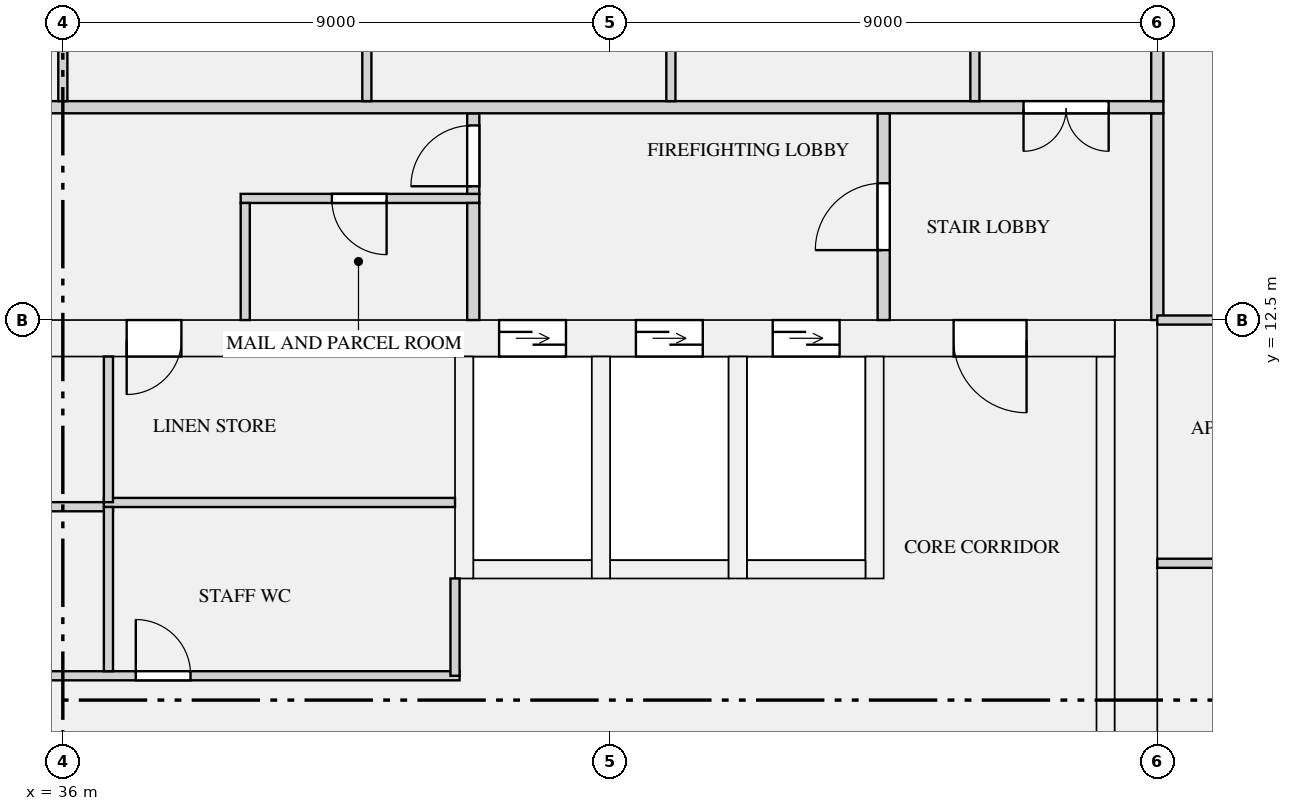
"""IFC4 building model, lengths in metres.
Left out: names, types, materials, properties, quantities, classifications, styles, units other than length and angle.
Written with IfcOpenShell. Run it as: python <this file> out.ifc"""

import sys

from ifc_helpers import new_model, si_unit, direction, frame, frame_2d, origin, place, context, subcontext, project, spatial, rectangle, extrude, element, fill, save


model = new_model("IFC4")
c1 = context("Model", 3, precision=1e-05, world=origin(), true_north=direction((0.0, 1.0)))
c2 = subcontext(c1, "Body", "Model", "MODEL_VIEW")
j1 = project(units=[si_unit("LENGTHUNIT", "METRE"), si_unit("PLANEANGLEUNIT", "RADIAN")], contexts=[c1])
p1 = place(None, origin())
s1 = spatial("IfcSite", under=j1, at=p1, CompositionType="ELEMENT")
p2 = place(p1, origin())
s2 = spatial("IfcBuilding", under=s1, at=p2, CompositionType="ELEMENT")
p3 = place(p2, frame((0.0, 0.0, 182.25)))
s3 = spatial("IfcBuildingStorey", under=s2, at=p3, CompositionType="ELEMENT", Elevation=182.25)
p4 = place(p3, frame((53.65, 0.0, 0.0), z_axis=(0.0, 0.0, 1.0), x_axis=(0.0, 1.0, 0.0)))
e1 = element("IfcWall", 1, at=p4, inside=s3, PredefinedType="SHEAR", context=c2, shape_type="SweptSolid", body=[
    extrude(rectangle(XDim=12.5, YDim=0.7, at=frame_2d((6.25, 0.0))), origin(), (0.0, 0.0, 1.0), 3.15),
])
p5 = place(p3, frame((18.7, 12.2, 0.0), z_axis=(0.0, 0.0, 1.0), x_axis=(1.0, 0.0, 0.0)))
e2 = element("IfcWall", 2, at=p5, inside=s3, PredefinedType="SHEAR", context=c2, shape_type="SweptSolid", body=[
    extrude(rectangle(XDim=34.6, YDim=0.6, at=frame_2d((17.3, 0.0))), origin(), (0.0, 0.0, 1.0), 3.15),
])
p6 = place(p5, frame((24.475, 0.0, 0.0)))
e3 = element("IfcOpeningElement", 3, at=p6, cuts=e2, PredefinedType="OPENING", context=c2, shape_type="SweptSolid", body=[
    extrude(rectangle(XDim=1.1, YDim=2.1, at=frame_2d((0.55, 1.05))), frame((0.0, 0.31, 0.0), z_axis=(0.0, -1.0, 0.0), x_axis=(1.0, 0.0, 0.0)), (0.0, 0.0, 1.0), 0.62),
])
p7 = place(p5, frame((26.725, 0.0, 0.0)))
e4 = element("IfcOpeningElement", 4, at=p7, cuts=e2, PredefinedType="OPENING", context=c2, shape_type="SweptSolid", body=[
    extrude(rectangle(XDim=1.1, YDim=2.1, at=frame_2d((0.55, 1.05))), frame((0.0, 0.31, 0.0), z_axis=(0.0, -1.0, 0.0), x_axis=(1.0, 0.0, 0.0)), (0.0, 0.0, 1.0), 0.62),
])
p8 = place(p5, frame((28.975, 0.0, 0.0)))
e5 = element("IfcOpeningElement", 5, at=p8, cuts=e2, PredefinedType="OPENING", context=c2, shape_type="SweptSolid", body=[
    extrude(rectangle(XDim=1.1, YDim=2.1, at=frame_2d((0.55, 1.05))), frame((0.0, 0.31, 0.0), z_axis=(0.0, -1.0, 0.0), x_axis=(1.0, 0.0, 0.0)), (0.0, 0.0, 1.0), 0.62),
])
p9 = place(p5, frame((4.85, 0.0, 0.0)))
e6 = element("IfcOpeningElement", 6, at=p9, cuts=e2, PredefinedType="OPENING", context=c2, shape_type="SweptSolid", body=[
    extrude(rectangle(XDim=0.9, YDim=2.1, at=frame_2d((0.45, 1.05))), frame((0.0, 0.31, 0.0), z_axis=(0.0, -1.0, 0.0), x_axis=(1.0, 0.0, 0.0)), (0.0, 0.0, 1.0), 0.62),
])
p10 = place(p5, frame((11.85, 0.0, 0.0)))
e7 = element("IfcOpeningElement", 7, at=p10, cuts=e2, PredefinedType="OPENING", context=c2, shape_type="SweptSolid", body=[
    extrude(rectangle(XDim=0.9, YDim=2.1, at=frame_2d((0.45, 1.05))), frame((0.0, 0.31, 0.0), z_axis=(0.0, -1.0, 0.0), x_axis=(1.0, 0.0, 0.0)), (0.0, 0.0, 1.0), 0.62),
])
p11 = place(p5, frame((18.35, 0.0, 0.0)))
e8 = element("IfcOpeningElement", 8, at=p11, cuts=e2, PredefinedType="OPENING", context=c2, shape_type="SweptSolid", body=[
    extrude(rectangle(XDim=0.9, YDim=2.1, at=frame_2d((0.45, 1.05))), frame((0.0, 0.31, 0.0), z_axis=(0.0, -1.0, 0.0), x_axis=(1.0, 0.0, 0.0)), (0.0, 0.0, 1.0), 0.62),
])
p12 = place(p5, frame((1.45, 0.0, 0.0)))
e9 = element("IfcOpeningElement", 9, at=p12, cuts=e2, PredefinedType="OPENING", context=c2, shape_type="SweptSolid", body=[
    extrude(rectangle(XDim=1.2, YDim=2.1, at=frame_2d((0.6, 1.05))), frame((0.0, 0.31, 0.0), z_axis=(0.0, -1.0, 0.0), x_axis=(1.0, 0.0, 0.0)), (0.0, 0.0, 1.0), 0.62),
])
p13 = place(p5, frame((31.95, 0.0, 0.0)))
e10 = element("IfcOpeningElement", 10, at=p13, cuts=e2, PredefinedType="OPENING", context=c2, shape_type="SweptSolid", body=[
    extrude(rectangle(XDim=1.2, YDim=2.1, at=frame_2d((0.6, 1.05))), frame((0.0, 0.31, 0.0), z_axis=(0.0, -1.0, 0.0), x_axis=(1.0, 0.0, 0.0)), (0.0, 0.0, 1.0), 0.62),
])
p14 = place(p3, frame((53.15, 1.0, 0.0), z_axis=(0.0, 0.0, 1.0), x_axis=(0.0, 1.0, 0.0)))
e11 = element("IfcWall", 11, at=p14, inside=s3, PredefinedType="SHEAR", context=c2, shape_type="SweptSolid", body=[
    extrude(rectangle(XDim=10.9, YDim=0.3, at=frame_2d((5.45, 0.0))), origin(), (0.0, 0.0, 1.0), 3.15),
])
p15 = place(p3, frame((42.75, 8.4, 0.0), z_axis=(0.0, 0.0, 1.0), x_axis=(1.0, 0.0, 0.0)))
e12 = element("IfcWall", 12, at=p15, inside=s3, PredefinedType="SHEAR", context=c2, shape_type="SweptSolid", body=[
    extrude(rectangle(XDim=1.95, YDim=0.3, at=frame_2d((0.975, 0.0))), origin(), (0.0, 0.0, 1.0), 3.15),
])
p16 = place(p3, frame((42.6, 8.25, 0.0), z_axis=(0.0, 0.0, 1.0), x_axis=(0.0, 1.0, 0.0)))
e13 = element("IfcWall", 13, at=p16, inside=s3, PredefinedType="SHEAR", context=c2, shape_type="SweptSolid", body=[
    extrude(rectangle(XDim=3.65, YDim=0.3, at=frame_2d((1.825, 0.0))), origin(), (0.0, 0.0, 1.0), 3.15),
])
p17 = place(p3, frame((45.0, 8.4, 0.0), z_axis=(0.0, 0.0, 1.0), x_axis=(1.0, 0.0, 0.0)))
e14 = element("IfcWall", 14, at=p17, inside=s3, PredefinedType="SHEAR", context=c2, shape_type="SweptSolid", body=[
    extrude(rectangle(XDim=1.95, YDim=0.3, at=frame_2d((0.975, 0.0))), origin(), (0.0, 0.0, 1.0), 3.15),
])
p18 = place(p3, frame((44.85, 8.25, 0.0), z_axis=(0.0, 0.0, 1.0), x_axis=(0.0, 1.0, 0.0)))
e15 = element("IfcWall", 15, at=p18, inside=s3, PredefinedType="SHEAR", context=c2, shape_type="SweptSolid", body=[
    extrude(rectangle(XDim=3.65, YDim=0.3, at=frame_2d((1.825, 0.0))), origin(), (0.0, 0.0, 1.0), 3.15),
])
p19 = place(p3, frame((47.25, 8.4, 0.0), z_axis=(0.0, 0.0, 1.0), x_axis=(1.0, 0.0, 0.0)))
e16 = element("IfcWall", 16, at=p19, inside=s3, PredefinedType="SHEAR", context=c2, shape_type="SweptSolid", body=[
    extrude(rectangle(XDim=1.95, YDim=0.3, at=frame_2d((0.975, 0.0))), origin(), (0.0, 0.0, 1.0), 3.15),
])
for number, where, z_axis, x_axis in (
    (17, (47.1, 8.25, 0.0), (0.0, 0.0, 1.0), (0.0, 1.0, 0.0)),
    (18, (49.35, 8.25, 0.0), (0.0, 0.0, 1.0), (0.0, 1.0, 0.0)),
):
    element("IfcWall", number, at=place(p3, frame(where, z_axis=z_axis, x_axis=x_axis)), inside=s3, PredefinedType="SHEAR", context=c2, shape_type="SweptSolid", body=[
        extrude(rectangle(XDim=3.65, YDim=0.3, at=frame_2d((1.825, 0.0))), origin(), (0.0, 0.0, 1.0), 3.15),
    ])
p20 = place(p3, frame((22.725, 6.65, 0.0), z_axis=(0.0, 0.0, 1.0), x_axis=(1.0, 0.0, 0.0)))
e19 = element("IfcWall", 19, at=p20, inside=s3, PredefinedType="PARTITIONING", context=c2, shape_type="SweptSolid", body=[
    extrude(rectangle(XDim=19.8, YDim=0.15, at=frame_2d((9.9, 0.0))), origin(), (0.0, 0.0, 1.0), 2.65),
])
p21 = place(p20, frame((0.825, 0.0, 0.0)))
e20 = element("IfcOpeningElement", 20, at=p21, cuts=e19, PredefinedType="OPENING", context=c2, shape_type="SweptSolid", body=[
    extrude(rectangle(XDim=0.9, YDim=2.1, at=frame_2d((0.45, 1.05))), frame((0.0, 0.085, 0.0), z_axis=(0.0, -1.0, 0.0), x_axis=(1.0, 0.0, 0.0)), (0.0, 0.0, 1.0), 0.17),
])
p22 = place(p20, frame((7.825, 0.0, 0.0)))
e21 = element("IfcOpeningElement", 21, at=p22, cuts=e19, PredefinedType="OPENING", context=c2, shape_type="SweptSolid", body=[
    extrude(rectangle(XDim=0.9, YDim=2.1, at=frame_2d((0.45, 1.05))), frame((0.0, 0.085, 0.0), z_axis=(0.0, -1.0, 0.0), x_axis=(1.0, 0.0, 0.0)), (0.0, 0.0, 1.0), 0.17),
])
p23 = place(p20, frame((14.475, 0.0, 0.0)))
e22 = element("IfcOpeningElement", 22, at=p23, cuts=e19, PredefinedType="OPENING", context=c2, shape_type="SweptSolid", body=[
    extrude(rectangle(XDim=0.9, YDim=2.1, at=frame_2d((0.45, 1.05))), frame((0.0, 0.085, 0.0), z_axis=(0.0, -1.0, 0.0), x_axis=(1.0, 0.0, 0.0)), (0.0, 0.0, 1.0), 0.17),
])
p24 = place(p3, frame((22.725, 9.43, 0.0), z_axis=(0.0, 0.0, 1.0), x_axis=(1.0, 0.0, 0.0)))
e23 = element("IfcWall", 23, at=p24, inside=s3, PredefinedType="PARTITIONING", context=c2, shape_type="SweptSolid", body=[
    extrude(rectangle(XDim=14.1, YDim=0.15, at=frame_2d((7.05, 0.0))), origin(), (0.0, 0.0, 1.0), 2.65),
])
p25 = place(p3, frame((36.675, 9.5, 0.0), z_axis=(0.0, 0.0, 1.0), x_axis=(1.0, 0.0, 0.0)))
e24 = element("IfcWall", 24, at=p25, inside=s3, PredefinedType="PARTITIONING", context=c2, shape_type="SweptSolid", body=[
    extrude(rectangle(XDim=5.775, YDim=0.15, at=frame_2d((2.887, 0.0))), origin(), (0.0, 0.0, 1.0), 2.65),
])
p26 = place(p3, frame((38.925, 14.5, 0.0), z_axis=(0.0, 0.0, 1.0), x_axis=(1.0, 0.0, 0.0)))
e25 = element("IfcWall", 25, at=p26, inside=s3, PredefinedType="PARTITIONING", context=c2, shape_type="SweptSolid", body=[
    extrude(rectangle(XDim=3.925, YDim=0.15, at=frame_2d((1.962, 0.0))), origin(), (0.0, 0.0, 1.0), 2.65),
])
p27 = place(p26, frame((1.5, 0.0, 0.0)))
e26 = element("IfcOpeningElement", 26, at=p27, cuts=e25, PredefinedType="OPENING", context=c2, shape_type="SweptSolid", body=[
    extrude(rectangle(XDim=0.9, YDim=2.1, at=frame_2d((0.45, 1.05))), frame((0.0, 0.085, 0.0), z_axis=(0.0, -1.0, 0.0), x_axis=(1.0, 0.0, 0.0)), (0.0, 0.0, 1.0), 0.17),
])
p28 = place(p3, frame((42.45, 6.65, 0.0), z_axis=(0.0, 0.0, 1.0), x_axis=(0.0, 1.0, 0.0)))
e27 = element("IfcWall", 27, at=p28, inside=s3, PredefinedType="PARTITIONING", context=c2, shape_type="SweptSolid", body=[
    extrude(rectangle(XDim=1.6, YDim=0.15, at=frame_2d((0.8, 0.0))), origin(), (0.0, 0.0, 1.0), 2.65),
])
p29 = place(p3, frame((36.75, 6.725, 0.0), z_axis=(0.0, 0.0, 1.0), x_axis=(0.0, 1.0, 0.0)))
e28 = element("IfcWall", 28, at=p29, inside=s3, PredefinedType="PARTITIONING", context=c2, shape_type="SweptSolid", body=[
    extrude(rectangle(XDim=2.7, YDim=0.15, at=frame_2d((1.35, 0.0))), origin(), (0.0, 0.0, 1.0), 2.65),
])
p30 = place(p3, frame((36.75, 9.505, 0.0), z_axis=(0.0, 0.0, 1.0), x_axis=(0.0, 1.0, 0.0)))
e29 = element("IfcWall", 29, at=p30, inside=s3, PredefinedType="PARTITIONING", context=c2, shape_type="SweptSolid", body=[
    extrude(rectangle(XDim=2.395, YDim=0.15, at=frame_2d((1.198, 0.0))), origin(), (0.0, 0.0, 1.0), 2.65),
])
p31 = place(p3, frame((39.0, 12.5, 0.0), z_axis=(0.0, 0.0, 1.0), x_axis=(0.0, 1.0, 0.0)))
e30 = element("IfcWall", 30, at=p31, inside=s3, PredefinedType="PARTITIONING", context=c2, shape_type="SweptSolid", body=[
    extrude(rectangle(XDim=1.925, YDim=0.15, at=frame_2d((0.962, 0.0))), origin(), (0.0, 0.0, 1.0), 2.65),
])
p32 = place(p3, frame((42.75, 12.5, 0.0), z_axis=(0.0, 0.0, 1.0), x_axis=(0.0, 1.0, 0.0)))
e31 = element("IfcWall", 31, at=p32, inside=s3, PredefinedType="PARTITIONING", context=c2, shape_type="SweptSolid", body=[
    extrude(rectangle(XDim=1.925, YDim=0.2, at=frame_2d((0.962, 0.0))), origin(), (0.0, 0.0, 1.0), 2.65),
])
p33 = place(p3, frame((49.5, 12.5, 0.0), z_axis=(0.0, 0.0, 1.0), x_axis=(0.0, 1.0, 0.0)))
e32 = element("IfcWall", 32, at=p33, inside=s3, PredefinedType="PARTITIONING", context=c2, shape_type="SweptSolid", body=[
    extrude(rectangle(XDim=3.4, YDim=0.2, at=frame_2d((1.7, 0.0))), origin(), (0.0, 0.0, 1.0), 2.65),
])
p34 = place(p33, frame((1.15, 0.0, 0.0)))
e33 = element("IfcOpeningElement", 33, at=p34, cuts=e32, PredefinedType="OPENING", context=c2, shape_type="SweptSolid", body=[
    extrude(rectangle(XDim=1.1, YDim=2.1, at=frame_2d((0.55, 1.05))), frame((0.0, 0.11, 0.0), z_axis=(0.0, -1.0, 0.0), x_axis=(1.0, 0.0, 0.0)), (0.0, 0.0, 1.0), 0.22),
])
p35 = place(p3, frame((54.0, 12.5, 0.0), z_axis=(0.0, 0.0, 1.0), x_axis=(0.0, 1.0, 0.0)))
e34 = element("IfcWall", 34, at=p35, inside=s3, PredefinedType="PARTITIONING", context=c2, shape_type="SweptSolid", body=[
    extrude(rectangle(XDim=3.4, YDim=0.2, at=frame_2d((1.7, 0.0))), origin(), (0.0, 0.0, 1.0), 2.65),
])
p36 = place(p3, frame((42.75, 14.575, 0.0), z_axis=(0.0, 0.0, 1.0), x_axis=(0.0, 1.0, 0.0)))
e35 = element("IfcWall", 35, at=p36, inside=s3, PredefinedType="PARTITIONING", context=c2, shape_type="SweptSolid", body=[
    extrude(rectangle(XDim=1.325, YDim=0.2, at=frame_2d((0.663, 0.0))), origin(), (0.0, 0.0, 1.0), 2.65),
])
p37 = place(p36, frame((0.125, 0.0, 0.0)))
e36 = element("IfcOpeningElement", 36, at=p37, cuts=e35, PredefinedType="OPENING", context=c2, shape_type="SweptSolid", body=[
    extrude(rectangle(XDim=1.0, YDim=2.1, at=frame_2d((0.5, 1.05))), frame((0.0, 0.11, 0.0), z_axis=(0.0, -1.0, 0.0), x_axis=(1.0, 0.0, 0.0)), (0.0, 0.0, 1.0), 0.22),
])
p38 = place(p3, frame((54.0, 8.5, 0.0), z_axis=(0.0, 0.0, 1.0), x_axis=(1.0, 0.0, 0.0)))
e37 = element("IfcWall", 37, at=p38, inside=s3, PredefinedType="PARTITIONING", context=c2, shape_type="SweptSolid", body=[
    extrude(rectangle(XDim=17.3, YDim=0.15, at=frame_2d((8.65, 0.0))), origin(), (0.0, 0.0, 1.0), 2.65),
])
p39 = place(p38, frame((1.8, 0.0, 0.0)))
e38 = element("IfcOpeningElement", 38, at=p39, cuts=e37, PredefinedType="OPENING", context=c2, shape_type="SweptSolid", body=[
    extrude(rectangle(XDim=0.9, YDim=2.1, at=frame_2d((0.45, 1.05))), frame((0.0, 0.085, 0.0), z_axis=(0.0, -1.0, 0.0), x_axis=(1.0, 0.0, 0.0)), (0.0, 0.0, 1.0), 0.17),
])
p40 = place(p38, frame((6.3, 0.0, 0.0)))
e39 = element("IfcOpeningElement", 39, at=p40, cuts=e37, PredefinedType="OPENING", context=c2, shape_type="SweptSolid", body=[
    extrude(rectangle(XDim=0.9, YDim=2.1, at=frame_2d((0.45, 1.05))), frame((0.0, 0.085, 0.0), z_axis=(0.0, -1.0, 0.0), x_axis=(1.0, 0.0, 0.0)), (0.0, 0.0, 1.0), 0.17),
])
p41 = place(p38, frame((10.8, 0.0, 0.0)))
e40 = element("IfcOpeningElement", 40, at=p41, cuts=e37, PredefinedType="OPENING", context=c2, shape_type="SweptSolid", body=[
    extrude(rectangle(XDim=0.9, YDim=2.1, at=frame_2d((0.45, 1.05))), frame((0.0, 0.085, 0.0), z_axis=(0.0, -1.0, 0.0), x_axis=(1.0, 0.0, 0.0)), (0.0, 0.0, 1.0), 0.17),
])
p42 = place(p3, frame((54.0, 12.5, 0.0), z_axis=(0.0, 0.0, 1.0), x_axis=(1.0, 0.0, 0.0)))
e41 = element("IfcWall", 41, at=p42, inside=s3, PredefinedType="PARTITIONING", context=c2, shape_type="SweptSolid", body=[
    extrude(rectangle(XDim=17.3, YDim=0.15, at=frame_2d((8.65, 0.0))), origin(), (0.0, 0.0, 1.0), 2.65),
])
p43 = place(p42, frame((1.5, 0.0, 0.0)))
e42 = element("IfcOpeningElement", 42, at=p43, cuts=e41, PredefinedType="OPENING", context=c2, shape_type="SweptSolid", body=[
    extrude(rectangle(XDim=1.5, YDim=2.1, at=frame_2d((0.75, 1.05))), frame((0.0, 0.085, 0.0), z_axis=(0.0, -1.0, 0.0), x_axis=(1.0, 0.0, 0.0)), (0.0, 0.0, 1.0), 0.17),
])
p44 = place(p42, frame((12.75, 0.0, 0.0)))
e43 = element("IfcOpeningElement", 43, at=p44, cuts=e41, PredefinedType="OPENING", context=c2, shape_type="SweptSolid", body=[
    extrude(rectangle(XDim=1.5, YDim=2.1, at=frame_2d((0.75, 1.05))), frame((0.0, 0.085, 0.0), z_axis=(0.0, -1.0, 0.0), x_axis=(1.0, 0.0, 0.0)), (0.0, 0.0, 1.0), 0.17),
])
p45 = place(p3, frame((17.9, 16.0, 0.0), z_axis=(0.0, 0.0, 1.0), x_axis=(1.0, 0.0, 0.0)))
e44 = element("IfcWall", 44, at=p45, inside=s3, PredefinedType="PARTITIONING", context=c2, shape_type="SweptSolid", body=[
    extrude(rectangle(XDim=36.2, YDim=0.2, at=frame_2d((18.1, 0.0))), origin(), (0.0, 0.0, 1.0), 2.65),
])
p46 = place(p45, frame((0.9, 0.0, 0.0)))
e45 = element("IfcOpeningElement", 45, at=p46, cuts=e44, PredefinedType="OPENING", context=c2, shape_type="SweptSolid", body=[
    extrude(rectangle(XDim=1.4, YDim=2.1, at=frame_2d((0.7, 1.05))), frame((0.0, 0.11, 0.0), z_axis=(0.0, -1.0, 0.0), x_axis=(1.0, 0.0, 0.0)), (0.0, 0.0, 1.0), 0.22),
])
p47 = place(p45, frame((33.9, 0.0, 0.0)))
e46 = element("IfcOpeningElement", 46, at=p47, cuts=e44, PredefinedType="OPENING", context=c2, shape_type="SweptSolid", body=[
    extrude(rectangle(XDim=1.4, YDim=2.1, at=frame_2d((0.7, 1.05))), frame((0.0, 0.11, 0.0), z_axis=(0.0, -1.0, 0.0), x_axis=(1.0, 0.0, 0.0)), (0.0, 0.0, 1.0), 0.22),
])
p48 = place(p3, frame((54.0, 16.1, 0.0), z_axis=(0.0, 0.0, 1.0), x_axis=(0.0, 1.0, 0.0)))
e47 = element("IfcWall", 47, at=p48, inside=s3, PredefinedType="PARTITIONING", context=c2, shape_type="SweptSolid", body=[
    extrude(rectangle(XDim=7.8, YDim=0.2, at=frame_2d((3.9, 0.0))), origin(), (0.0, 0.0, 1.0), 2.65),
])
p49 = place(p48, frame((1.85, 0.0, 0.0)))
e48 = element("IfcOpeningElement", 48, at=p49, cuts=e47, PredefinedType="OPENING", context=c2, shape_type="SweptSolid", body=[
    extrude(rectangle(XDim=1.1, YDim=2.1, at=frame_2d((0.55, 1.05))), frame((0.0, 0.11, 0.0), z_axis=(0.0, -1.0, 0.0), x_axis=(1.0, 0.0, 0.0)), (0.0, 0.0, 1.0), 0.22),
])
for number, where, z_axis, x_axis in (
    (49, (51.0, 16.1, 0.0), (0.0, 0.0, 1.0), (0.0, 1.0, 0.0)),
    (50, (36.0, 16.1, 0.0), (0.0, 0.0, 1.0), (0.0, 1.0, 0.0)),
    (51, (41.0, 16.1, 0.0), (0.0, 0.0, 1.0), (0.0, 1.0, 0.0)),
    (52, (46.0, 16.1, 0.0), (0.0, 0.0, 1.0), (0.0, 1.0, 0.0)),
):
    element("IfcWall", number, at=place(p3, frame(where, z_axis=z_axis, x_axis=x_axis)), inside=s3, PredefinedType="PARTITIONING", context=c2, shape_type="SweptSolid", body=[
        extrude(rectangle(XDim=4.825, YDim=0.15, at=frame_2d((2.413, 0.0))), origin(), (0.0, 0.0, 1.0), 2.65),
    ])
p50 = place(p6, origin())
e53 = element("IfcDoor", 53, at=p50, inside=s3, OperationType="DOUBLE_DOOR_SLIDING", PredefinedType="DOOR", context=c2, shape_type="SweptSolid", body=[
    extrude(rectangle(XDim=1.1, YDim=2.1, at=frame_2d((0.55, 1.05))), frame((0.0, 0.025, 0.0), z_axis=(0.0, -1.0, 0.0), x_axis=(1.0, 0.0, 0.0)), (0.0, 0.0, 1.0), 0.05),
])
fill(e3, e53)
p51 = place(p7, origin())
e54 = element("IfcDoor", 54, at=p51, inside=s3, OperationType="DOUBLE_DOOR_SLIDING", PredefinedType="DOOR", context=c2, shape_type="SweptSolid", body=[
    extrude(rectangle(XDim=1.1, YDim=2.1, at=frame_2d((0.55, 1.05))), frame((0.0, 0.025, 0.0), z_axis=(0.0, -1.0, 0.0), x_axis=(1.0, 0.0, 0.0)), (0.0, 0.0, 1.0), 0.05),
])
fill(e4, e54)
p52 = place(p8, origin())
e55 = element("IfcDoor", 55, at=p52, inside=s3, OperationType="DOUBLE_DOOR_SLIDING", PredefinedType="DOOR", context=c2, shape_type="SweptSolid", body=[
    extrude(rectangle(XDim=1.1, YDim=2.1, at=frame_2d((0.55, 1.05))), frame((0.0, 0.025, 0.0), z_axis=(0.0, -1.0, 0.0), x_axis=(1.0, 0.0, 0.0)), (0.0, 0.0, 1.0), 0.05),
])
fill(e5, e55)
p53 = place(p27, frame((0.9, 0.0, 0.0), z_axis=(0.0, 0.0, 1.0), x_axis=(-1.0, 0.0, 0.0)))
e56 = element("IfcDoor", 56, at=p53, inside=s3, OperationType="SINGLE_SWING_LEFT", PredefinedType="DOOR", context=c2, shape_type="SweptSolid", body=[
    extrude(rectangle(XDim=0.9, YDim=2.1, at=frame_2d((0.45, 1.05))), frame((0.0, 0.025, 0.0), z_axis=(0.0, -1.0, 0.0), x_axis=(1.0, 0.0, 0.0)), (0.0, 0.0, 1.0), 0.05),
])
fill(e26, e56)
p54 = place(p23, origin())
e57 = element("IfcDoor", 57, at=p54, inside=s3, OperationType="SINGLE_SWING_LEFT", PredefinedType="DOOR", context=c2, shape_type="SweptSolid", body=[
    extrude(rectangle(XDim=0.9, YDim=2.1, at=frame_2d((0.45, 1.05))), frame((0.0, 0.025, 0.0), z_axis=(0.0, -1.0, 0.0), x_axis=(1.0, 0.0, 0.0)), (0.0, 0.0, 1.0), 0.05),
])
fill(e22, e57)
p55 = place(p11, frame((0.9, 0.0, 0.0), z_axis=(0.0, 0.0, 1.0), x_axis=(-1.0, 0.0, 0.0)))
e58 = element("IfcDoor", 58, at=p55, inside=s3, OperationType="SINGLE_SWING_RIGHT", PredefinedType="DOOR", context=c2, shape_type="SweptSolid", body=[
    extrude(rectangle(XDim=0.9, YDim=2.1, at=frame_2d((0.45, 1.05))), frame((0.0, 0.025, 0.0), z_axis=(0.0, -1.0, 0.0), x_axis=(1.0, 0.0, 0.0)), (0.0, 0.0, 1.0), 0.05),
])
fill(e8, e58)
p56 = place(p13, frame((1.2, 0.0, 0.0), z_axis=(0.0, 0.0, 1.0), x_axis=(-1.0, 0.0, 0.0)))
e59 = element("IfcDoor", 59, at=p56, inside=s3, OperationType="SINGLE_SWING_LEFT", PredefinedType="DOOR", context=c2, shape_type="SweptSolid", body=[
    extrude(rectangle(XDim=1.2, YDim=2.1, at=frame_2d((0.6, 1.05))), frame((0.0, 0.025, 0.0), z_axis=(0.0, -1.0, 0.0), x_axis=(1.0, 0.0, 0.0)), (0.0, 0.0, 1.0), 0.05),
])
fill(e10, e59)
p57 = place(p37, origin())
e60 = element("IfcDoor", 60, at=p57, inside=s3, OperationType="SINGLE_SWING_LEFT", PredefinedType="DOOR", context=c2, shape_type="SweptSolid", body=[
    extrude(rectangle(XDim=1.0, YDim=2.1, at=frame_2d((0.5, 1.05))), frame((0.0, 0.025, 0.0), z_axis=(0.0, -1.0, 0.0), x_axis=(1.0, 0.0, 0.0)), (0.0, 0.0, 1.0), 0.05),
])
fill(e36, e60)
p58 = place(p34, origin())
e61 = element("IfcDoor", 61, at=p58, inside=s3, OperationType="SINGLE_SWING_LEFT", PredefinedType="DOOR", context=c2, shape_type="SweptSolid", body=[
    extrude(rectangle(XDim=1.1, YDim=2.1, at=frame_2d((0.55, 1.05))), frame((0.0, 0.025, 0.0), z_axis=(0.0, -1.0, 0.0), x_axis=(1.0, 0.0, 0.0)), (0.0, 0.0, 1.0), 0.05),
])
fill(e33, e61)
p59 = place(p47, frame((1.4, 0.0, 0.0), z_axis=(0.0, 0.0, 1.0), x_axis=(-1.0, 0.0, 0.0)))
e62 = element("IfcDoor", 62, at=p59, inside=s3, OperationType="DOUBLE_DOOR_SINGLE_SWING", PredefinedType="DOOR", context=c2, shape_type="SweptSolid", body=[
    extrude(rectangle(XDim=1.4, YDim=2.1, at=frame_2d((0.7, 1.05))), frame((0.0, 0.025, 0.0), z_axis=(0.0, -1.0, 0.0), x_axis=(1.0, 0.0, 0.0)), (0.0, 0.0, 1.0), 0.05),
])
fill(e46, e62)
save(model, sys.argv[1])
